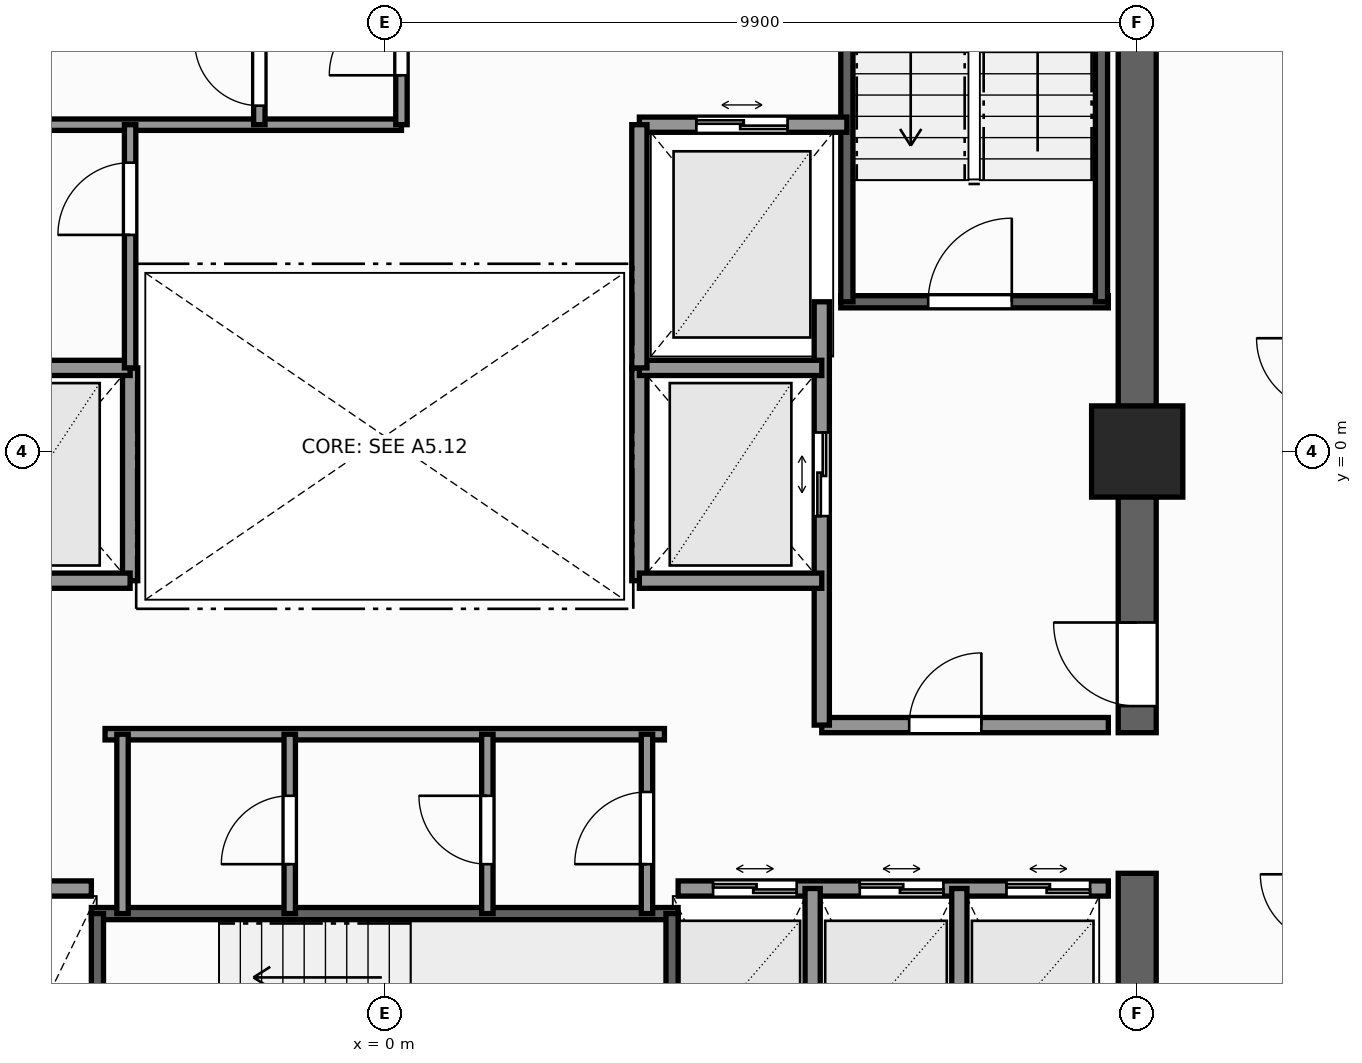
"""IFC4 building model, lengths in metres.
Left out: names, types, materials, properties, quantities, classifications, styles, units other than length and angle.
Written with IfcOpenShell. Run it as: python <this file> out.ifc"""

import sys

from ifc_helpers import new_model, si_unit, direction, frame, frame_2d, origin, origin_2d, place, context, subcontext, project, spatial, rectangle, extrude, element, fill, save


model = new_model("IFC4")
c1 = context("Model", 3, precision=1e-05, world=origin(), true_north=direction((0.0, 1.0)))
c2 = subcontext(c1, "Body", "Model", "MODEL_VIEW")
j1 = project(units=[si_unit("LENGTHUNIT", "METRE"), si_unit("PLANEANGLEUNIT", "RADIAN")], contexts=[c1])
p1 = place(None, origin())
s1 = spatial("IfcSite", under=j1, at=p1, CompositionType="ELEMENT")
p2 = place(p1, origin())
s2 = spatial("IfcBuilding", under=s1, at=p2, CompositionType="ELEMENT")
p3 = place(p2, frame((0.0, 0.0, 156.9)))
s3 = spatial("IfcBuildingStorey", under=s2, at=p3, CompositionType="ELEMENT", Elevation=156.9)
p4 = place(p3, frame((9.9, -9.65, 0.0), z_axis=(0.0, 0.0, 1.0), x_axis=(0.0, 1.0, 0.0)))
e1 = element("IfcWall", 1, at=p4, inside=s3, PredefinedType="SHEAR", context=c2, shape_type="SweptSolid", body=[
    extrude(rectangle(XDim=4.1, YDim=0.5, at=frame_2d((2.05, 0.0))), origin(), (0.0, 0.0, 1.0), 3.3),
])
p5 = place(p3, frame((9.9, -3.7, 0.0), z_axis=(0.0, 0.0, 1.0), x_axis=(0.0, 1.0, 0.0)))
e2 = element("IfcWall", 2, at=p5, inside=s3, PredefinedType="SHEAR", context=c2, shape_type="SweptSolid", body=[
    extrude(rectangle(XDim=13.35, YDim=0.5, at=frame_2d((6.675, 0.0))), origin(), (0.0, 0.0, 1.0), 3.3),
])
p6 = place(p5, frame((0.35, 0.0, 0.0)))
e3 = element("IfcOpeningElement", 3, at=p6, cuts=e2, PredefinedType="OPENING", context=c2, shape_type="SweptSolid", body=[
    extrude(rectangle(XDim=1.1, YDim=2.2, at=frame_2d((0.55, 1.1))), frame((0.0, 0.26, 0.0), z_axis=(0.0, -1.0, 0.0), x_axis=(1.0, 0.0, 0.0)), (0.0, 0.0, 1.0), 0.52),
])
p7 = place(p3, frame((9.9, 0.0, 0.0), z_axis=(0.0, 0.0, 1.0), x_axis=(1.0, 0.0, 0.0)))
e4 = element("IfcColumn", 4, at=p7, inside=s3, PredefinedType="COLUMN", context=c2, shape_type="SweptSolid", body=[
    extrude(rectangle(XDim=1.2, YDim=1.2, at=origin_2d()), origin(), (0.0, 0.0, 1.0), 3.3),
])
p8 = place(p3, frame((6.0, 1.97, 0.0), z_axis=(0.0, 0.0, 1.0), x_axis=(1.0, 0.0, 0.0)))
e5 = element("IfcWall", 5, at=p8, inside=s3, PredefinedType="SHEAR", context=c2, shape_type="SweptSolid", body=[
    extrude(rectangle(XDim=3.52, YDim=0.16, at=frame_2d((1.76, 0.0))), origin(), (0.0, 0.0, 1.0), 3.3),
])
p9 = place(p8, frame((1.15, 0.0, 0.0)))
e6 = element("IfcOpeningElement", 6, at=p9, cuts=e5, PredefinedType="OPENING", context=c2, shape_type="SweptSolid", body=[
    extrude(rectangle(XDim=1.1, YDim=2.2, at=frame_2d((0.55, 1.1))), frame((0.0, 0.09, 0.0), z_axis=(0.0, -1.0, 0.0), x_axis=(1.0, 0.0, 0.0)), (0.0, 0.0, 1.0), 0.18),
])
for number, where, z_axis, x_axis in (
    (7, (6.08, 1.97, 0.0), (0.0, 0.0, 1.0), (0.0, 1.0, 0.0)),
    (8, (9.43, 1.97, 0.0), (0.0, 0.0, 1.0), (0.0, 1.0, 0.0)),
):
    element("IfcWall", number, at=place(p3, frame(where, z_axis=z_axis, x_axis=x_axis)), inside=s3, PredefinedType="SHEAR", context=c2, shape_type="SweptSolid", body=[
        extrude(rectangle(XDim=7.56, YDim=0.16, at=frame_2d((3.78, 0.0))), origin(), (0.0, 0.0, 1.0), 3.3),
    ])
p10 = place(p3, frame((-3.86, -6.08, 0.0), z_axis=(0.0, 0.0, 1.0), x_axis=(1.0, 0.0, 0.0)))
e9 = element("IfcWall", 9, at=p10, inside=s3, PredefinedType="SHEAR", context=c2, shape_type="SweptSolid", body=[
    extrude(rectangle(XDim=7.72, YDim=0.16, at=frame_2d((3.86, 0.0))), origin(), (0.0, 0.0, 1.0), 3.3),
])
for number, where, z_axis, x_axis in (
    (10, (-3.78, -9.43, 0.0), (0.0, 0.0, 1.0), (0.0, 1.0, 0.0)),
    (11, (3.78, -9.43, 0.0), (0.0, 0.0, 1.0), (0.0, 1.0, 0.0)),
):
    element("IfcWall", number, at=place(p3, frame(where, z_axis=z_axis, x_axis=x_axis)), inside=s3, PredefinedType="SHEAR", context=c2, shape_type="SweptSolid", body=[
        extrude(rectangle(XDim=3.35, YDim=0.16, at=frame_2d((1.675, 0.0))), origin(), (0.0, 0.0, 1.0), 3.3),
    ])
p11 = place(p3, frame((-3.35, -1.7, 0.0), z_axis=(0.0, 0.0, 1.0), x_axis=(0.0, 1.0, 0.0)))
e12 = element("IfcWall", 12, at=p11, inside=s3, PredefinedType="SOLIDWALL", context=c2, shape_type="SweptSolid", body=[
    extrude(rectangle(XDim=2.8, YDim=0.2, at=frame_2d((1.4, 0.0))), origin(), (0.0, 0.0, 1.0), 2.735),
])
for number, where, z_axis, x_axis in (
    (13, (-5.75, -1.7, 0.0), (0.0, 0.0, 1.0), (1.0, 0.0, 0.0)),
    (14, (-5.75, 1.1, 0.0), (0.0, 0.0, 1.0), (1.0, 0.0, 0.0)),
):
    element("IfcWall", number, at=place(p3, frame(where, z_axis=z_axis, x_axis=x_axis)), inside=s3, PredefinedType="SOLIDWALL", context=c2, shape_type="SweptSolid", body=[
        extrude(rectangle(XDim=2.4, YDim=0.2, at=frame_2d((1.2, 0.0))), origin(), (0.0, 0.0, 1.0), 3.1),
    ])
p12 = place(p3, frame((5.75, -3.6, 0.0), z_axis=(0.0, 0.0, 1.0), x_axis=(1.0, 0.0, 0.0)))
e15 = element("IfcWall", 15, at=p12, inside=s3, PredefinedType="SOLIDWALL", context=c2, shape_type="SweptSolid", body=[
    extrude(rectangle(XDim=3.77, YDim=0.2, at=frame_2d((1.885, 0.0))), origin(), (0.0, 0.0, 1.0), 3.1),
])
p13 = place(p12, frame((1.15, 0.0, 0.0)))
e16 = element("IfcOpeningElement", 16, at=p13, cuts=e15, PredefinedType="OPENING", context=c2, shape_type="SweptSolid", body=[
    extrude(rectangle(XDim=0.95, YDim=2.06, at=frame_2d((0.475, 1.03))), frame((0.0, 0.11, 0.0), z_axis=(0.0, -1.0, 0.0), x_axis=(1.0, 0.0, 0.0)), (0.0, 0.0, 1.0), 0.22),
])
p14 = place(p3, frame((5.75, -3.6, 0.0), z_axis=(0.0, 0.0, 1.0), x_axis=(0.0, 1.0, 0.0)))
e17 = element("IfcWall", 17, at=p14, inside=s3, PredefinedType="SOLIDWALL", context=c2, shape_type="SweptSolid", body=[
    extrude(rectangle(XDim=5.57, YDim=0.2, at=frame_2d((2.785, 0.0))), origin(), (0.0, 0.0, 1.0), 2.735),
])
p15 = place(p14, frame((2.75, 0.0, 0.0)))
e18 = element("IfcOpeningElement", 18, at=p15, cuts=e17, PredefinedType="OPENING", context=c2, shape_type="SweptSolid", body=[
    extrude(rectangle(XDim=1.1, YDim=2.2, at=frame_2d((0.55, 1.1))), frame((0.0, 0.11, 0.0), z_axis=(0.0, -1.0, 0.0), x_axis=(1.0, 0.0, 0.0)), (0.0, 0.0, 1.0), 0.22),
])
p16 = place(p3, frame((3.35, -1.7, 0.0), z_axis=(0.0, 0.0, 1.0), x_axis=(0.0, 1.0, 0.0)))
e19 = element("IfcWall", 19, at=p16, inside=s3, PredefinedType="SOLIDWALL", context=c2, shape_type="SweptSolid", body=[
    extrude(rectangle(XDim=2.8, YDim=0.2, at=frame_2d((1.4, 0.0))), origin(), (0.0, 0.0, 1.0), 2.735),
])
for number, where, z_axis, x_axis in (
    (20, (3.35, -1.7, 0.0), (0.0, 0.0, 1.0), (1.0, 0.0, 0.0)),
    (21, (3.35, 1.1, 0.0), (0.0, 0.0, 1.0), (1.0, 0.0, 0.0)),
):
    element("IfcWall", number, at=place(p3, frame(where, z_axis=z_axis, x_axis=x_axis)), inside=s3, PredefinedType="SOLIDWALL", context=c2, shape_type="SweptSolid", body=[
        extrude(rectangle(XDim=2.4, YDim=0.2, at=frame_2d((1.2, 0.0))), origin(), (0.0, 0.0, 1.0), 3.1),
    ])
p17 = place(p3, frame((3.35, 4.3, 0.0), z_axis=(0.0, 0.0, 1.0), x_axis=(1.0, 0.0, 0.0)))
e22 = element("IfcWall", 22, at=p17, inside=s3, PredefinedType="SOLIDWALL", context=c2, shape_type="SweptSolid", body=[
    extrude(rectangle(XDim=2.73, YDim=0.2, at=frame_2d((1.365, 0.0))), origin(), (0.0, 0.0, 1.0), 3.1),
])
p18 = place(p17, frame((0.75, 0.0, 0.0)))
e23 = element("IfcOpeningElement", 23, at=p18, cuts=e22, PredefinedType="OPENING", context=c2, shape_type="SweptSolid", body=[
    extrude(rectangle(XDim=1.2, YDim=2.25, at=frame_2d((0.6, 1.125))), frame((0.0, 0.11, 0.0), z_axis=(0.0, -1.0, 0.0), x_axis=(1.0, 0.0, 0.0)), (0.0, 0.0, 1.0), 0.22),
])
p19 = place(p3, frame((3.35, 1.1, 0.0), z_axis=(0.0, 0.0, 1.0), x_axis=(0.0, 1.0, 0.0)))
e24 = element("IfcWall", 24, at=p19, inside=s3, PredefinedType="SOLIDWALL", context=c2, shape_type="SweptSolid", body=[
    extrude(rectangle(XDim=3.2, YDim=0.2, at=frame_2d((1.6, 0.0))), origin(), (0.0, 0.0, 1.0), 2.735),
])
p20 = place(p3, frame((-6.08, 4.3, 0.0), z_axis=(0.0, 0.0, 1.0), x_axis=(1.0, 0.0, 0.0)))
e25 = element("IfcWall", 25, at=p20, inside=s3, PredefinedType="PARTITIONING", context=c2, shape_type="SweptSolid", body=[
    extrude(rectangle(XDim=6.3, YDim=0.15, at=frame_2d((3.15, 0.0))), origin(), (0.0, 0.0, 1.0), 3.1),
])
p21 = place(p3, frame((0.22, 4.3, 0.0), z_axis=(0.0, 0.0, 1.0), x_axis=(0.0, 1.0, 0.0)))
e26 = element("IfcWall", 26, at=p21, inside=s3, PredefinedType="PARTITIONING", context=c2, shape_type="SweptSolid", body=[
    extrude(rectangle(XDim=5.22, YDim=0.15, at=frame_2d((2.61, 0.0))), origin(), (0.0, 0.0, 1.0), 3.1),
])
p22 = place(p21, frame((0.65, 0.0, 0.0)))
e27 = element("IfcOpeningElement", 27, at=p22, cuts=e26, PredefinedType="OPENING", context=c2, shape_type="SweptSolid", body=[
    extrude(rectangle(XDim=0.95, YDim=2.06, at=frame_2d((0.475, 1.03))), frame((0.0, 0.085, 0.0), z_axis=(0.0, -1.0, 0.0), x_axis=(1.0, 0.0, 0.0)), (0.0, 0.0, 1.0), 0.17),
])
p23 = place(p3, frame((-1.65, 4.3, 0.0), z_axis=(0.0, 0.0, 1.0), x_axis=(0.0, 1.0, 0.0)))
e28 = element("IfcWall", 28, at=p23, inside=s3, PredefinedType="PARTITIONING", context=c2, shape_type="SweptSolid", body=[
    extrude(rectangle(XDim=5.22, YDim=0.15, at=frame_2d((2.61, 0.0))), origin(), (0.0, 0.0, 1.0), 3.1),
])
p24 = place(p23, frame((2.2, 0.0, 0.0)))
e29 = element("IfcOpeningElement", 29, at=p24, cuts=e28, PredefinedType="OPENING", context=c2, shape_type="SweptSolid", body=[
    extrude(rectangle(XDim=0.85, YDim=2.03, at=frame_2d((0.425, 1.015))), frame((0.0, 0.085, 0.0), z_axis=(0.0, -1.0, 0.0), x_axis=(1.0, 0.0, 0.0)), (0.0, 0.0, 1.0), 0.17),
])
p25 = place(p23, frame((0.25, 0.0, 0.0)))
e30 = element("IfcOpeningElement", 30, at=p25, cuts=e28, PredefinedType="OPENING", context=c2, shape_type="SweptSolid", body=[
    extrude(rectangle(XDim=0.85, YDim=2.03, at=frame_2d((0.425, 1.015))), frame((0.0, 0.085, 0.0), z_axis=(0.0, -1.0, 0.0), x_axis=(1.0, 0.0, 0.0)), (0.0, 0.0, 1.0), 0.17),
])
p26 = place(p3, frame((-9.52, -5.75, 0.0), z_axis=(0.0, 0.0, 1.0), x_axis=(1.0, 0.0, 0.0)))
e31 = element("IfcWall", 31, at=p26, inside=s3, PredefinedType="SOLIDWALL", context=c2, shape_type="SweptSolid", body=[
    extrude(rectangle(XDim=5.66, YDim=0.2, at=frame_2d((2.83, 0.0))), origin(), (0.0, 0.0, 1.0), 3.1),
])
p27 = place(p3, frame((3.86, -5.75, 0.0), z_axis=(0.0, 0.0, 1.0), x_axis=(1.0, 0.0, 0.0)))
e32 = element("IfcWall", 32, at=p27, inside=s3, PredefinedType="SOLIDWALL", context=c2, shape_type="SweptSolid", body=[
    extrude(rectangle(XDim=5.66, YDim=0.2, at=frame_2d((2.83, 0.0))), origin(), (0.0, 0.0, 1.0), 3.1),
])
p28 = place(p27, frame((0.46, 0.0, 0.0)))
e33 = element("IfcOpeningElement", 33, at=p28, cuts=e32, PredefinedType="OPENING", context=c2, shape_type="SweptSolid", body=[
    extrude(rectangle(XDim=1.1, YDim=2.2, at=frame_2d((0.55, 1.1))), frame((0.0, 0.11, 0.0), z_axis=(0.0, -1.0, 0.0), x_axis=(1.0, 0.0, 0.0)), (0.0, 0.0, 1.0), 0.22),
])
p29 = place(p27, frame((2.39, 0.0, 0.0)))
e34 = element("IfcOpeningElement", 34, at=p29, cuts=e32, PredefinedType="OPENING", context=c2, shape_type="SweptSolid", body=[
    extrude(rectangle(XDim=1.1, YDim=2.2, at=frame_2d((0.55, 1.1))), frame((0.0, 0.11, 0.0), z_axis=(0.0, -1.0, 0.0), x_axis=(1.0, 0.0, 0.0)), (0.0, 0.0, 1.0), 0.22),
])
p30 = place(p27, frame((4.32, 0.0, 0.0)))
e35 = element("IfcOpeningElement", 35, at=p30, cuts=e32, PredefinedType="OPENING", context=c2, shape_type="SweptSolid", body=[
    extrude(rectangle(XDim=1.1, YDim=2.2, at=frame_2d((0.55, 1.1))), frame((0.0, 0.11, 0.0), z_axis=(0.0, -1.0, 0.0), x_axis=(1.0, 0.0, 0.0)), (0.0, 0.0, 1.0), 0.22),
])
for number, where, z_axis, x_axis in (
    (36, (5.63, -9.52, 0.0), (0.0, 0.0, 1.0), (0.0, 1.0, 0.0)),
    (37, (7.56, -9.52, 0.0), (0.0, 0.0, 1.0), (0.0, 1.0, 0.0)),
):
    element("IfcWall", number, at=place(p3, frame(where, z_axis=z_axis, x_axis=x_axis)), inside=s3, PredefinedType="SOLIDWALL", context=c2, shape_type="SweptSolid", body=[
        extrude(rectangle(XDim=3.77, YDim=0.2, at=frame_2d((1.885, 0.0))), origin(), (0.0, 0.0, 1.0), 3.1),
    ])
p31 = place(p3, frame((-3.68, -3.72, 0.0), z_axis=(0.0, 0.0, 1.0), x_axis=(1.0, 0.0, 0.0)))
e38 = element("IfcWall", 38, at=p31, inside=s3, PredefinedType="PARTITIONING", context=c2, shape_type="SweptSolid", body=[
    extrude(rectangle(XDim=7.36, YDim=0.15, at=frame_2d((3.68, 0.0))), origin(), (0.0, 0.0, 1.0), 3.1),
])
p32 = place(p3, frame((3.45, -6.08, 0.0), z_axis=(0.0, 0.0, 1.0), x_axis=(0.0, 1.0, 0.0)))
e39 = element("IfcWall", 39, at=p32, inside=s3, PredefinedType="PARTITIONING", context=c2, shape_type="SweptSolid", body=[
    extrude(rectangle(XDim=2.36, YDim=0.15, at=frame_2d((1.18, 0.0))), origin(), (0.0, 0.0, 1.0), 3.1),
])
p33 = place(p32, frame((0.65, 0.0, 0.0)))
e40 = element("IfcOpeningElement", 40, at=p33, cuts=e39, PredefinedType="OPENING", context=c2, shape_type="SweptSolid", body=[
    extrude(rectangle(XDim=0.95, YDim=2.06, at=frame_2d((0.475, 1.03))), frame((0.0, 0.085, 0.0), z_axis=(0.0, -1.0, 0.0), x_axis=(1.0, 0.0, 0.0)), (0.0, 0.0, 1.0), 0.17),
])
p34 = place(p3, frame((-3.45, -6.08, 0.0), z_axis=(0.0, 0.0, 1.0), x_axis=(0.0, 1.0, 0.0)))
e41 = element("IfcWall", 41, at=p34, inside=s3, PredefinedType="PARTITIONING", context=c2, shape_type="SweptSolid", body=[
    extrude(rectangle(XDim=2.36, YDim=0.15, at=frame_2d((1.18, 0.0))), origin(), (0.0, 0.0, 1.0), 3.1),
])
p35 = place(p3, frame((1.35, -6.08, 0.0), z_axis=(0.0, 0.0, 1.0), x_axis=(0.0, 1.0, 0.0)))
e42 = element("IfcWall", 42, at=p35, inside=s3, PredefinedType="PARTITIONING", context=c2, shape_type="SweptSolid", body=[
    extrude(rectangle(XDim=2.36, YDim=0.15, at=frame_2d((1.18, 0.0))), origin(), (0.0, 0.0, 1.0), 3.1),
])
p36 = place(p35, frame((0.65, 0.0, 0.0)))
e43 = element("IfcOpeningElement", 43, at=p36, cuts=e42, PredefinedType="OPENING", context=c2, shape_type="SweptSolid", body=[
    extrude(rectangle(XDim=0.9, YDim=2.06, at=frame_2d((0.45, 1.03))), frame((0.0, 0.085, 0.0), z_axis=(0.0, -1.0, 0.0), x_axis=(1.0, 0.0, 0.0)), (0.0, 0.0, 1.0), 0.17),
])
p37 = place(p3, frame((-1.25, -6.08, 0.0), z_axis=(0.0, 0.0, 1.0), x_axis=(0.0, 1.0, 0.0)))
e44 = element("IfcWall", 44, at=p37, inside=s3, PredefinedType="PARTITIONING", context=c2, shape_type="SweptSolid", body=[
    extrude(rectangle(XDim=2.36, YDim=0.15, at=frame_2d((1.18, 0.0))), origin(), (0.0, 0.0, 1.0), 3.1),
])
p38 = place(p37, frame((0.65, 0.0, 0.0)))
e45 = element("IfcOpeningElement", 45, at=p38, cuts=e44, PredefinedType="OPENING", context=c2, shape_type="SweptSolid", body=[
    extrude(rectangle(XDim=0.9, YDim=2.06, at=frame_2d((0.45, 1.03))), frame((0.0, 0.085, 0.0), z_axis=(0.0, -1.0, 0.0), x_axis=(1.0, 0.0, 0.0)), (0.0, 0.0, 1.0), 0.17),
])
p39 = place(p3, frame((-3.35, 1.1, 0.0), z_axis=(0.0, 0.0, 1.0), x_axis=(0.0, 1.0, 0.0)))
e46 = element("IfcWall", 46, at=p39, inside=s3, PredefinedType="PARTITIONING", context=c2, shape_type="SweptSolid", body=[
    extrude(rectangle(XDim=3.2, YDim=0.15, at=frame_2d((1.6, 0.0))), origin(), (0.0, 0.0, 1.0), 2.735),
])
p40 = place(p39, frame((1.75, 0.0, 0.0)))
e47 = element("IfcOpeningElement", 47, at=p40, cuts=e46, PredefinedType="OPENING", context=c2, shape_type="SweptSolid", body=[
    extrude(rectangle(XDim=0.95, YDim=2.06, at=frame_2d((0.475, 1.03))), frame((0.0, 0.085, 0.0), z_axis=(0.0, -1.0, 0.0), x_axis=(1.0, 0.0, 0.0)), (0.0, 0.0, 1.0), 0.17),
])
p41 = place(p9, origin())
e48 = element("IfcDoor", 48, at=p41, inside=s3, OperationType="SINGLE_SWING_RIGHT", PredefinedType="DOOR", context=c2, shape_type="SweptSolid", body=[
    extrude(rectangle(XDim=1.1, YDim=2.2, at=frame_2d((0.55, 1.1))), frame((0.0, 0.025, 0.0), z_axis=(0.0, -1.0, 0.0), x_axis=(1.0, 0.0, 0.0)), (0.0, 0.0, 1.0), 0.05),
])
fill(e6, e48)
p42 = place(p6, origin())
e49 = element("IfcDoor", 49, at=p42, inside=s3, OperationType="SINGLE_SWING_RIGHT", PredefinedType="DOOR", context=c2, shape_type="SweptSolid", body=[
    extrude(rectangle(XDim=1.1, YDim=2.2, at=frame_2d((0.55, 1.1))), frame((0.0, 0.025, 0.0), z_axis=(0.0, -1.0, 0.0), x_axis=(1.0, 0.0, 0.0)), (0.0, 0.0, 1.0), 0.05),
])
fill(e3, e49)
p43 = place(p15, origin())
e50 = element("IfcDoor", 50, at=p43, inside=s3, OperationType="DOUBLE_DOOR_SLIDING", PredefinedType="DOOR", context=c2, shape_type="SweptSolid", body=[
    extrude(rectangle(XDim=1.1, YDim=2.2, at=frame_2d((0.55, 1.1))), frame((0.0, 0.025, 0.0), z_axis=(0.0, -1.0, 0.0), x_axis=(1.0, 0.0, 0.0)), (0.0, 0.0, 1.0), 0.05),
])
fill(e18, e50)
p44 = place(p18, origin())
e51 = element("IfcDoor", 51, at=p44, inside=s3, OperationType="DOUBLE_DOOR_SLIDING", PredefinedType="DOOR", context=c2, shape_type="SweptSolid", body=[
    extrude(rectangle(XDim=1.2, YDim=2.25, at=frame_2d((0.6, 1.125))), frame((0.0, 0.025, 0.0), z_axis=(0.0, -1.0, 0.0), x_axis=(1.0, 0.0, 0.0)), (0.0, 0.0, 1.0), 0.05),
])
fill(e23, e51)
p45 = place(p22, origin())
e52 = element("IfcDoor", 52, at=p45, inside=s3, OperationType="SINGLE_SWING_LEFT", PredefinedType="DOOR", context=c2, shape_type="SweptSolid", body=[
    extrude(rectangle(XDim=0.95, YDim=2.06, at=frame_2d((0.475, 1.03))), frame((0.0, 0.025, 0.0), z_axis=(0.0, -1.0, 0.0), x_axis=(1.0, 0.0, 0.0)), (0.0, 0.0, 1.0), 0.05),
])
fill(e27, e52)
p46 = place(p25, origin())
e53 = element("IfcDoor", 53, at=p46, inside=s3, OperationType="SINGLE_SWING_RIGHT", PredefinedType="DOOR", context=c2, shape_type="SweptSolid", body=[
    extrude(rectangle(XDim=0.85, YDim=2.03, at=frame_2d((0.425, 1.015))), frame((0.0, 0.025, 0.0), z_axis=(0.0, -1.0, 0.0), x_axis=(1.0, 0.0, 0.0)), (0.0, 0.0, 1.0), 0.05),
])
fill(e30, e53)
p47 = place(p28, origin())
e54 = element("IfcDoor", 54, at=p47, inside=s3, OperationType="DOUBLE_DOOR_SLIDING", PredefinedType="DOOR", context=c2, shape_type="SweptSolid", body=[
    extrude(rectangle(XDim=1.1, YDim=2.2, at=frame_2d((0.55, 1.1))), frame((0.0, 0.025, 0.0), z_axis=(0.0, -1.0, 0.0), x_axis=(1.0, 0.0, 0.0)), (0.0, 0.0, 1.0), 0.05),
])
fill(e33, e54)
p48 = place(p29, origin())
e55 = element("IfcDoor", 55, at=p48, inside=s3, OperationType="DOUBLE_DOOR_SLIDING", PredefinedType="DOOR", context=c2, shape_type="SweptSolid", body=[
    extrude(rectangle(XDim=1.1, YDim=2.2, at=frame_2d((0.55, 1.1))), frame((0.0, 0.025, 0.0), z_axis=(0.0, -1.0, 0.0), x_axis=(1.0, 0.0, 0.0)), (0.0, 0.0, 1.0), 0.05),
])
fill(e34, e55)
p49 = place(p30, origin())
e56 = element("IfcDoor", 56, at=p49, inside=s3, OperationType="DOUBLE_DOOR_SLIDING", PredefinedType="DOOR", context=c2, shape_type="SweptSolid", body=[
    extrude(rectangle(XDim=1.1, YDim=2.2, at=frame_2d((0.55, 1.1))), frame((0.0, 0.025, 0.0), z_axis=(0.0, -1.0, 0.0), x_axis=(1.0, 0.0, 0.0)), (0.0, 0.0, 1.0), 0.05),
])
fill(e35, e56)
p50 = place(p13, origin())
e57 = element("IfcDoor", 57, at=p50, inside=s3, OperationType="SINGLE_SWING_RIGHT", PredefinedType="DOOR", context=c2, shape_type="SweptSolid", body=[
    extrude(rectangle(XDim=0.95, YDim=2.06, at=frame_2d((0.475, 1.03))), frame((0.0, 0.025, 0.0), z_axis=(0.0, -1.0, 0.0), x_axis=(1.0, 0.0, 0.0)), (0.0, 0.0, 1.0), 0.05),
])
fill(e16, e57)
p51 = place(p33, origin())
e58 = element("IfcDoor", 58, at=p51, inside=s3, OperationType="SINGLE_SWING_LEFT", PredefinedType="DOOR", context=c2, shape_type="SweptSolid", body=[
    extrude(rectangle(XDim=0.95, YDim=2.06, at=frame_2d((0.475, 1.03))), frame((0.0, 0.025, 0.0), z_axis=(0.0, -1.0, 0.0), x_axis=(1.0, 0.0, 0.0)), (0.0, 0.0, 1.0), 0.05),
])
fill(e40, e58)
p52 = place(p36, origin())
e59 = element("IfcDoor", 59, at=p52, inside=s3, OperationType="SINGLE_SWING_RIGHT", PredefinedType="DOOR", context=c2, shape_type="SweptSolid", body=[
    extrude(rectangle(XDim=0.9, YDim=2.06, at=frame_2d((0.45, 1.03))), frame((0.0, 0.025, 0.0), z_axis=(0.0, -1.0, 0.0), x_axis=(1.0, 0.0, 0.0)), (0.0, 0.0, 1.0), 0.05),
])
fill(e43, e59)
p53 = place(p38, origin())
e60 = element("IfcDoor", 60, at=p53, inside=s3, OperationType="SINGLE_SWING_LEFT", PredefinedType="DOOR", context=c2, shape_type="SweptSolid", body=[
    extrude(rectangle(XDim=0.9, YDim=2.06, at=frame_2d((0.45, 1.03))), frame((0.0, 0.025, 0.0), z_axis=(0.0, -1.0, 0.0), x_axis=(1.0, 0.0, 0.0)), (0.0, 0.0, 1.0), 0.05),
])
fill(e45, e60)
p54 = place(p40, origin())
e61 = element("IfcDoor", 61, at=p54, inside=s3, OperationType="SINGLE_SWING_LEFT", PredefinedType="DOOR", context=c2, shape_type="SweptSolid", body=[
    extrude(rectangle(XDim=0.95, YDim=2.06, at=frame_2d((0.475, 1.03))), frame((0.0, 0.025, 0.0), z_axis=(0.0, -1.0, 0.0), x_axis=(1.0, 0.0, 0.0)), (0.0, 0.0, 1.0), 0.05),
])
fill(e47, e61)
save(model, sys.argv[1])
